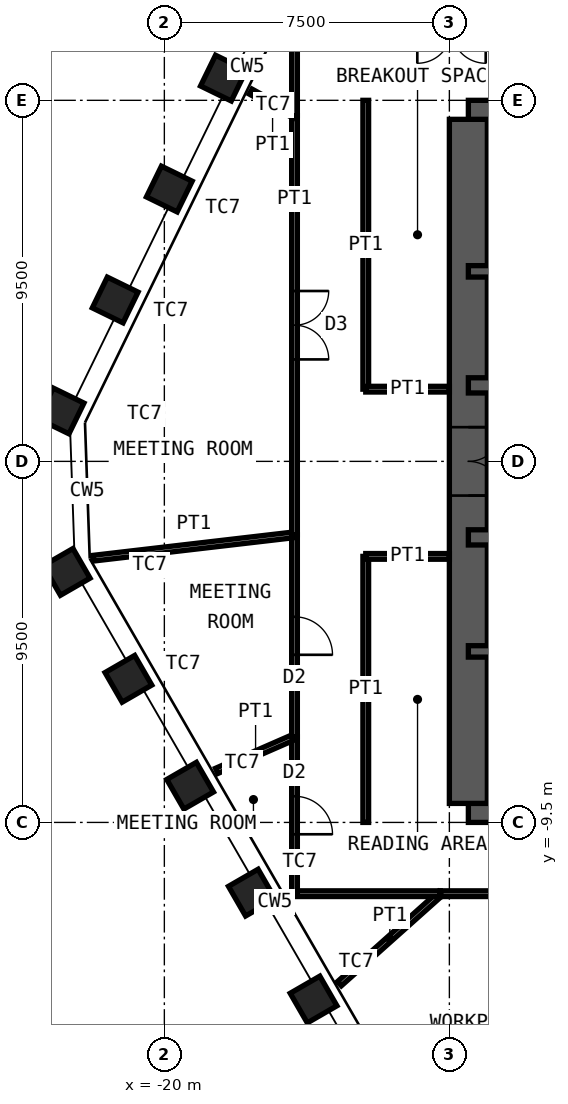
"""IFC4 building model, lengths in metres.
Left out: names, types, materials, properties, quantities, classifications, styles, units other than length and angle.
Written with IfcOpenShell. Run it as: python <this file> out.ifc"""

import sys

from ifc_helpers import new_model, si_unit, direction, frame, frame_2d, origin, origin_2d, place, context, subcontext, project, spatial, rectangle, hollow_rectangle, extrude, element, fill, save


model = new_model("IFC4")
c1 = context("Model", 3, precision=1e-05, world=origin(), true_north=direction((0.0, 1.0)))
c2 = subcontext(c1, "Body", "Model", "MODEL_VIEW")
j1 = project(units=[si_unit("LENGTHUNIT", "METRE"), si_unit("PLANEANGLEUNIT", "RADIAN")], contexts=[c1])
p1 = place(None, origin())
s1 = spatial("IfcSite", under=j1, at=p1, CompositionType="ELEMENT")
p2 = place(p1, origin())
s2 = spatial("IfcBuilding", under=s1, at=p2, CompositionType="ELEMENT")
p3 = place(p2, frame((0.0, 0.0, 283.0)))
s3 = spatial("IfcBuildingStorey", under=s2, at=p3, CompositionType="ELEMENT", Elevation=283.0)
for number, where, z_axis, x_axis in (
    (1, (-16.073, -14.16, 0.0), (0.0, 0.0, 1.0), (0.5, -0.866, 0.0)),
    (2, (-17.698, -11.347, 0.0), (0.0, 0.0, 1.0), (0.5, -0.866, 0.0)),
    (3, (-19.322, -8.534, 0.0), (0.0, 0.0, 1.0), (0.5, -0.866, 0.0)),
    (4, (-20.946, -5.721, 0.0), (0.0, 0.0, 1.0), (0.5, -0.866, 0.0)),
    (5, (-22.57, -2.908, 0.0), (0.0, 0.0, 1.0), (0.5, -0.866, 0.0)),
    (6, (-22.717, 1.327, 0.0), (0.0, 0.0, 1.0), (-0.438, -0.899, 0.0)),
    (7, (-21.293, 4.246, 0.0), (0.0, 0.0, 1.0), (-0.438, -0.899, 0.0)),
    (8, (-19.87, 7.166, 0.0), (0.0, 0.0, 1.0), (-0.438, -0.899, 0.0)),
    (9, (-18.446, 10.085, 0.0), (0.0, 0.0, 1.0), (-0.438, -0.899, 0.0)),
):
    element("IfcColumn", number, at=place(p3, frame(where, z_axis=z_axis, x_axis=x_axis)), inside=s3, PredefinedType="COLUMN", context=c2, shape_type="SweptSolid", body=[
        extrude(hollow_rectangle(XDim=0.9, YDim=0.9, WallThickness=0.06, at=origin_2d()), origin(), (0.0, 0.0, 1.0), 4.2),
    ])
p4 = place(p3, frame((-12.0, 9.0, 0.0), z_axis=(0.0, 0.0, 1.0), x_axis=(1.0, 0.0, 0.0)))
e10 = element("IfcWall", 10, at=p4, inside=s3, PredefinedType="SHEAR", context=c2, shape_type="SweptSolid", body=[
    extrude(rectangle(XDim=24.0, YDim=1.0, at=frame_2d((12.0, 0.0))), origin(), (0.0, 0.0, 1.0), 4.2),
])
p5 = place(p4, frame((10.4, 0.0, 0.0)))
e11 = element("IfcOpeningElement", 11, at=p5, cuts=e10, PredefinedType="OPENING", context=c2, shape_type="SweptSolid", body=[
    extrude(rectangle(XDim=1.0, YDim=2.1, at=frame_2d((0.5, 1.05))), frame((0.0, 0.51, 0.0), z_axis=(0.0, -1.0, 0.0), x_axis=(1.0, 0.0, 0.0)), (0.0, 0.0, 1.0), 1.02),
])
p6 = place(p4, frame((17.6, 0.0, 0.0)))
e12 = element("IfcOpeningElement", 12, at=p6, cuts=e10, PredefinedType="OPENING", context=c2, shape_type="SweptSolid", body=[
    extrude(rectangle(XDim=0.9, YDim=2.1, at=frame_2d((0.45, 1.05))), frame((0.0, 0.51, 0.0), z_axis=(0.0, -1.0, 0.0), x_axis=(1.0, 0.0, 0.0)), (0.0, 0.0, 1.0), 1.02),
])
p7 = place(p4, frame((21.9, 0.0, 0.0)))
e13 = element("IfcOpeningElement", 13, at=p7, cuts=e10, PredefinedType="OPENING", context=c2, shape_type="SweptSolid", body=[
    extrude(rectangle(XDim=0.9, YDim=2.1, at=frame_2d((0.45, 1.05))), frame((0.0, 0.51, 0.0), z_axis=(0.0, -1.0, 0.0), x_axis=(1.0, 0.0, 0.0)), (0.0, 0.0, 1.0), 1.02),
])
p8 = place(p3, frame((-12.0, -9.0, 0.0), z_axis=(0.0, 0.0, 1.0), x_axis=(1.0, 0.0, 0.0)))
e14 = element("IfcWall", 14, at=p8, inside=s3, PredefinedType="SHEAR", context=c2, shape_type="SweptSolid", body=[
    extrude(rectangle(XDim=24.0, YDim=1.0, at=frame_2d((12.0, 0.0))), origin(), (0.0, 0.0, 1.0), 4.2),
])
p9 = place(p8, frame((1.35, 0.0, 0.0)))
e15 = element("IfcOpeningElement", 15, at=p9, cuts=e14, PredefinedType="OPENING", context=c2, shape_type="SweptSolid", body=[
    extrude(rectangle(XDim=1.0, YDim=2.1, at=frame_2d((0.5, 1.05))), frame((0.0, 0.51, 0.0), z_axis=(0.0, -1.0, 0.0), x_axis=(1.0, 0.0, 0.0)), (0.0, 0.0, 1.0), 1.02),
])
p10 = place(p8, frame((5.325, 0.0, 0.0)))
e16 = element("IfcOpeningElement", 16, at=p10, cuts=e14, PredefinedType="OPENING", context=c2, shape_type="SweptSolid", body=[
    extrude(rectangle(XDim=1.15, YDim=2.1, at=frame_2d((0.575, 1.05))), frame((0.0, 0.51, 0.0), z_axis=(0.0, -1.0, 0.0), x_axis=(1.0, 0.0, 0.0)), (0.0, 0.0, 1.0), 1.02),
])
p11 = place(p8, frame((12.6, 0.0, 0.0)))
e17 = element("IfcOpeningElement", 17, at=p11, cuts=e14, PredefinedType="OPENING", context=c2, shape_type="SweptSolid", body=[
    extrude(rectangle(XDim=1.0, YDim=2.1, at=frame_2d((0.5, 1.05))), frame((0.0, 0.51, 0.0), z_axis=(0.0, -1.0, 0.0), x_axis=(1.0, 0.0, 0.0)), (0.0, 0.0, 1.0), 1.02),
])
p12 = place(p3, frame((-12.0, -9.0, 0.0), z_axis=(0.0, 0.0, 1.0), x_axis=(0.0, 1.0, 0.0)))
e18 = element("IfcWall", 18, at=p12, inside=s3, PredefinedType="SHEAR", context=c2, shape_type="SweptSolid", body=[
    extrude(rectangle(XDim=18.0, YDim=1.0, at=frame_2d((9.0, 0.0))), origin(), (0.0, 0.0, 1.0), 4.2),
])
p13 = place(p12, frame((8.1, 0.0, 0.0)))
e19 = element("IfcOpeningElement", 19, at=p13, cuts=e18, PredefinedType="OPENING", context=c2, shape_type="SweptSolid", body=[
    extrude(rectangle(XDim=1.8, YDim=2.1, at=frame_2d((0.9, 1.05))), frame((0.0, 0.51, 0.0), z_axis=(0.0, -1.0, 0.0), x_axis=(1.0, 0.0, 0.0)), (0.0, 0.0, 1.0), 1.02),
])
p14 = place(p3, frame((-12.0, 5.0, 0.0), z_axis=(0.0, 0.0, 1.0), x_axis=(1.0, 0.0, 0.0)))
e20 = element("IfcWall", 20, at=p14, inside=s3, PredefinedType="SHEAR", context=c2, shape_type="SweptSolid", body=[
    extrude(rectangle(XDim=24.0, YDim=0.3, at=frame_2d((12.0, 0.0))), origin(), (0.0, 0.0, 1.0), 4.2),
])
p15 = place(p3, frame((-12.0, 2.0, 0.0), z_axis=(0.0, 0.0, 1.0), x_axis=(1.0, 0.0, 0.0)))
e21 = element("IfcWall", 21, at=p15, inside=s3, PredefinedType="SHEAR", context=c2, shape_type="SweptSolid", body=[
    extrude(rectangle(XDim=24.0, YDim=0.4, at=frame_2d((12.0, 0.0))), origin(), (0.0, 0.0, 1.0), 4.2),
])
p16 = place(p15, frame((2.4, 0.0, 0.0)))
e22 = element("IfcOpeningElement", 22, at=p16, cuts=e21, PredefinedType="OPENING", context=c2, shape_type="SweptSolid", body=[
    extrude(rectangle(XDim=1.1, YDim=2.1, at=frame_2d((0.55, 1.05))), frame((0.0, 0.21, 0.0), z_axis=(0.0, -1.0, 0.0), x_axis=(1.0, 0.0, 0.0)), (0.0, 0.0, 1.0), 0.42),
])
p17 = place(p15, frame((22.0, 0.0, 0.0)))
e23 = element("IfcOpeningElement", 23, at=p17, cuts=e21, PredefinedType="OPENING", context=c2, shape_type="SweptSolid", body=[
    extrude(rectangle(XDim=1.1, YDim=2.1, at=frame_2d((0.55, 1.05))), frame((0.0, 0.21, 0.0), z_axis=(0.0, -1.0, 0.0), x_axis=(1.0, 0.0, 0.0)), (0.0, 0.0, 1.0), 0.42),
])
p18 = place(p15, frame((10.15, 0.0, 0.0)))
e24 = element("IfcOpeningElement", 24, at=p18, cuts=e21, PredefinedType="OPENING", context=c2, shape_type="SweptSolid", body=[
    extrude(rectangle(XDim=1.0, YDim=2.1, at=frame_2d((0.5, 1.05))), frame((0.0, 0.21, 0.0), z_axis=(0.0, -1.0, 0.0), x_axis=(1.0, 0.0, 0.0)), (0.0, 0.0, 1.0), 0.42),
])
p19 = place(p15, frame((6.9, 0.0, 0.0)))
e25 = element("IfcOpeningElement", 25, at=p19, cuts=e21, PredefinedType="OPENING", context=c2, shape_type="SweptSolid", body=[
    extrude(rectangle(XDim=1.0, YDim=2.1, at=frame_2d((0.5, 1.05))), frame((0.0, 0.21, 0.0), z_axis=(0.0, -1.0, 0.0), x_axis=(1.0, 0.0, 0.0)), (0.0, 0.0, 1.0), 0.42),
])
p20 = place(p15, frame((13.35, 0.0, 0.0)))
e26 = element("IfcOpeningElement", 26, at=p20, cuts=e21, PredefinedType="OPENING", context=c2, shape_type="SweptSolid", body=[
    extrude(rectangle(XDim=1.1, YDim=2.4, at=frame_2d((0.55, 1.2))), frame((0.0, 0.21, 0.0), z_axis=(0.0, -1.0, 0.0), x_axis=(1.0, 0.0, 0.0)), (0.0, 0.0, 1.0), 0.42),
])
p21 = place(p15, frame((16.15, 0.0, 0.0)))
e27 = element("IfcOpeningElement", 27, at=p21, cuts=e21, PredefinedType="OPENING", context=c2, shape_type="SweptSolid", body=[
    extrude(rectangle(XDim=1.1, YDim=2.4, at=frame_2d((0.55, 1.2))), frame((0.0, 0.21, 0.0), z_axis=(0.0, -1.0, 0.0), x_axis=(1.0, 0.0, 0.0)), (0.0, 0.0, 1.0), 0.42),
])
p22 = place(p15, frame((19.0, 0.0, 0.0)))
e28 = element("IfcOpeningElement", 28, at=p22, cuts=e21, PredefinedType="OPENING", context=c2, shape_type="SweptSolid", body=[
    extrude(rectangle(XDim=1.0, YDim=2.1, at=frame_2d((0.5, 1.05))), frame((0.0, 0.21, 0.0), z_axis=(0.0, -1.0, 0.0), x_axis=(1.0, 0.0, 0.0)), (0.0, 0.0, 1.0), 0.42),
])
p23 = place(p3, frame((-12.0, -2.0, 0.0), z_axis=(0.0, 0.0, 1.0), x_axis=(1.0, 0.0, 0.0)))
e29 = element("IfcWall", 29, at=p23, inside=s3, PredefinedType="SHEAR", context=c2, shape_type="SweptSolid", body=[
    extrude(rectangle(XDim=24.0, YDim=0.4, at=frame_2d((12.0, 0.0))), origin(), (0.0, 0.0, 1.0), 4.2),
])
p24 = place(p23, frame((1.1, 0.0, 0.0)))
e30 = element("IfcOpeningElement", 30, at=p24, cuts=e29, PredefinedType="OPENING", context=c2, shape_type="SweptSolid", body=[
    extrude(rectangle(XDim=1.1, YDim=2.1, at=frame_2d((0.55, 1.05))), frame((0.0, 0.21, 0.0), z_axis=(0.0, -1.0, 0.0), x_axis=(1.0, 0.0, 0.0)), (0.0, 0.0, 1.0), 0.42),
])
p25 = place(p23, frame((13.55, 0.0, 0.0)))
e31 = element("IfcOpeningElement", 31, at=p25, cuts=e29, PredefinedType="OPENING", context=c2, shape_type="SweptSolid", body=[
    extrude(rectangle(XDim=1.1, YDim=2.1, at=frame_2d((0.55, 1.05))), frame((0.0, 0.21, 0.0), z_axis=(0.0, -1.0, 0.0), x_axis=(1.0, 0.0, 0.0)), (0.0, 0.0, 1.0), 0.42),
])
p26 = place(p23, frame((20.7, 0.0, 0.0)))
e32 = element("IfcOpeningElement", 32, at=p26, cuts=e29, PredefinedType="OPENING", context=c2, shape_type="SweptSolid", body=[
    extrude(rectangle(XDim=1.1, YDim=2.1, at=frame_2d((0.55, 1.05))), frame((0.0, 0.21, 0.0), z_axis=(0.0, -1.0, 0.0), x_axis=(1.0, 0.0, 0.0)), (0.0, 0.0, 1.0), 0.42),
])
p27 = place(p23, frame((4.0, 0.0, 0.0)))
e33 = element("IfcOpeningElement", 33, at=p27, cuts=e29, PredefinedType="OPENING", context=c2, shape_type="SweptSolid", body=[
    extrude(rectangle(XDim=1.0, YDim=2.1, at=frame_2d((0.5, 1.05))), frame((0.0, 0.21, 0.0), z_axis=(0.0, -1.0, 0.0), x_axis=(1.0, 0.0, 0.0)), (0.0, 0.0, 1.0), 0.42),
])
p28 = place(p23, frame((6.8, 0.0, 0.0)))
e34 = element("IfcOpeningElement", 34, at=p28, cuts=e29, PredefinedType="OPENING", context=c2, shape_type="SweptSolid", body=[
    extrude(rectangle(XDim=1.0, YDim=2.1, at=frame_2d((0.5, 1.05))), frame((0.0, 0.21, 0.0), z_axis=(0.0, -1.0, 0.0), x_axis=(1.0, 0.0, 0.0)), (0.0, 0.0, 1.0), 0.42),
])
p29 = place(p23, frame((9.6, 0.0, 0.0)))
e35 = element("IfcOpeningElement", 35, at=p29, cuts=e29, PredefinedType="OPENING", context=c2, shape_type="SweptSolid", body=[
    extrude(rectangle(XDim=1.0, YDim=2.1, at=frame_2d((0.5, 1.05))), frame((0.0, 0.21, 0.0), z_axis=(0.0, -1.0, 0.0), x_axis=(1.0, 0.0, 0.0)), (0.0, 0.0, 1.0), 0.42),
])
p30 = place(p3, frame((-12.0, -5.0, 0.0), z_axis=(0.0, 0.0, 1.0), x_axis=(1.0, 0.0, 0.0)))
e36 = element("IfcWall", 36, at=p30, inside=s3, PredefinedType="SHEAR", context=c2, shape_type="SweptSolid", body=[
    extrude(rectangle(XDim=24.0, YDim=0.3, at=frame_2d((12.0, 0.0))), origin(), (0.0, 0.0, 1.0), 4.2),
])
p31 = place(p3, frame((-5.027, -11.375, 0.0), z_axis=(0.0, 0.0, 1.0), x_axis=(-1.0, 0.0, 0.0)))
e37 = element("IfcWall", 37, at=p31, inside=s3, PredefinedType="PARTITIONING", context=c2, shape_type="SweptSolid", body=[
    extrude(rectangle(XDim=7.713, YDim=0.15, at=frame_2d((3.856, 0.0))), origin(), (0.0, 0.0, 1.0), 4.03),
])
p32 = place(p31, frame((3.356, 0.0, 0.0)))
e38 = element("IfcOpeningElement", 38, at=p32, cuts=e37, PredefinedType="OPENING", context=c2, shape_type="SweptSolid", body=[
    extrude(rectangle(XDim=1.0, YDim=2.4, at=frame_2d((0.5, 1.2))), frame((0.0, 0.085, 0.0), z_axis=(0.0, -1.0, 0.0), x_axis=(1.0, 0.0, 0.0)), (0.0, 0.0, 1.0), 0.17),
])
p33 = place(p3, frame((-15.393, -13.743, 0.0), z_axis=(0.0, 0.0, 1.0), x_axis=(0.745934007174, 0.666019862273, 0.0)))
e39 = element("IfcWall", 39, at=p33, inside=s3, PredefinedType="PARTITIONING", context=c2, shape_type="SweptSolid", body=[
    extrude(rectangle(XDim=3.556, YDim=0.15, at=frame_2d((1.778, 0.0))), origin(), (0.0, 0.0, 1.0), 3.33),
])
p34 = place(p3, frame((-12.74, -11.375, 0.0), z_axis=(0.0, 0.0, 1.0), x_axis=(-1.0, 0.0, 0.0)))
e40 = element("IfcWall", 40, at=p34, inside=s3, PredefinedType="PARTITIONING", context=c2, shape_type="SweptSolid", body=[
    extrude(rectangle(XDim=3.835, YDim=0.15, at=frame_2d((1.917, 0.0))), origin(), (0.0, 0.0, 1.0), 4.03),
])
p35 = place(p3, frame((-16.575, -11.375, 0.0), z_axis=(0.0, 0.0, 1.0), x_axis=(0.0, 1.0, 0.0)))
e41 = element("IfcWall", 41, at=p35, inside=s3, PredefinedType="PARTITIONING", context=c2, shape_type="SweptSolid", body=[
    extrude(rectangle(XDim=4.127, YDim=0.15, at=frame_2d((2.063, 0.0))), origin(), (0.0, 0.0, 1.0), 4.03),
])
p36 = place(p35, frame((1.563, 0.0, 0.0)))
e42 = element("IfcOpeningElement", 42, at=p36, cuts=e41, PredefinedType="OPENING", context=c2, shape_type="SweptSolid", body=[
    extrude(rectangle(XDim=1.0, YDim=2.4, at=frame_2d((0.5, 1.2))), frame((0.0, 0.085, 0.0), z_axis=(0.0, -1.0, 0.0), x_axis=(1.0, 0.0, 0.0)), (0.0, 0.0, 1.0), 0.17),
])
p37 = place(p3, frame((-18.624, -8.144, 0.0), z_axis=(0.0, 0.0, 1.0), x_axis=(0.916199931106, 0.400721457176, 0.0)))
e43 = element("IfcWall", 43, at=p37, inside=s3, PredefinedType="PARTITIONING", context=c2, shape_type="SweptSolid", body=[
    extrude(rectangle(XDim=2.236, YDim=0.15, at=frame_2d((1.118, 0.0))), origin(), (0.0, 0.0, 1.0), 3.33),
])
p38 = place(p3, frame((-16.575, -7.248, 0.0), z_axis=(0.0, 0.0, 1.0), x_axis=(0.0, 1.0, 0.0)))
e44 = element("IfcWall", 44, at=p38, inside=s3, PredefinedType="PARTITIONING", context=c2, shape_type="SweptSolid", body=[
    extrude(rectangle(XDim=5.317, YDim=0.15, at=frame_2d((2.659, 0.0))), origin(), (0.0, 0.0, 1.0), 4.03),
])
p39 = place(p38, frame((2.159, 0.0, 0.0)))
e45 = element("IfcOpeningElement", 45, at=p39, cuts=e44, PredefinedType="OPENING", context=c2, shape_type="SweptSolid", body=[
    extrude(rectangle(XDim=1.0, YDim=2.4, at=frame_2d((0.5, 1.2))), frame((0.0, 0.085, 0.0), z_axis=(0.0, -1.0, 0.0), x_axis=(1.0, 0.0, 0.0)), (0.0, 0.0, 1.0), 0.17),
])
p40 = place(p3, frame((-21.864, -2.547, 0.0), z_axis=(0.0, 0.0, 1.0), x_axis=(0.993286690457, 0.115678652143, 0.0)))
e46 = element("IfcWall", 46, at=p40, inside=s3, PredefinedType="PARTITIONING", context=c2, shape_type="SweptSolid", body=[
    extrude(rectangle(XDim=5.325, YDim=0.15, at=frame_2d((2.662, 0.0))), origin(), (0.0, 0.0, 1.0), 2.93),
])
p41 = place(p3, frame((-16.575, -1.931, 0.0), z_axis=(0.0, 0.0, 1.0), x_axis=(0.0, 1.0, 0.0)))
e47 = element("IfcWall", 47, at=p41, inside=s3, PredefinedType="PARTITIONING", context=c2, shape_type="SweptSolid", body=[
    extrude(rectangle(XDim=11.028, YDim=0.15, at=frame_2d((5.514, 0.0))), origin(), (0.0, 0.0, 1.0), 4.03),
])
p42 = place(p41, frame((4.614, 0.0, 0.0)))
e48 = element("IfcOpeningElement", 48, at=p42, cuts=e47, PredefinedType="OPENING", context=c2, shape_type="SweptSolid", body=[
    extrude(rectangle(XDim=1.8, YDim=2.4, at=frame_2d((0.9, 1.2))), frame((0.0, 0.085, 0.0), z_axis=(0.0, -1.0, 0.0), x_axis=(1.0, 0.0, 0.0)), (0.0, 0.0, 1.0), 0.17),
])
p43 = place(p3, frame((-17.729, 9.73, 0.0), z_axis=(0.0, 0.0, 1.0), x_axis=(0.87667364743, -0.481085559855, 0.0)))
e49 = element("IfcWall", 49, at=p43, inside=s3, PredefinedType="PARTITIONING", context=c2, shape_type="SweptSolid", body=[
    extrude(rectangle(XDim=1.316, YDim=0.15, at=frame_2d((0.658, 0.0))), origin(), (0.0, 0.0, 1.0), 3.33),
])
p44 = place(p3, frame((-16.575, 9.097, 0.0), z_axis=(0.0, 0.0, 1.0), x_axis=(0.0, 1.0, 0.0)))
e50 = element("IfcWall", 50, at=p44, inside=s3, PredefinedType="PARTITIONING", context=c2, shape_type="SweptSolid", body=[
    extrude(rectangle(XDim=2.278, YDim=0.15, at=frame_2d((1.139, 0.0))), origin(), (0.0, 0.0, 1.0), 4.03),
])
p45 = place(p3, frame((-14.7, 1.9, 0.0), z_axis=(0.0, 0.0, 1.0), x_axis=(0.0, 1.0, 0.0)))
e51 = element("IfcWall", 51, at=p45, inside=s3, PredefinedType="PARTITIONING", context=c2, shape_type="SweptSolid", body=[
    extrude(rectangle(XDim=7.6, YDim=0.15, at=frame_2d((3.8, 0.0))), origin(), (0.0, 0.0, 1.0), 4.03),
])
p46 = place(p3, frame((-12.5, 1.9, 0.0), z_axis=(0.0, 0.0, 1.0), x_axis=(-1.0, 0.0, 0.0)))
e52 = element("IfcWall", 52, at=p46, inside=s3, PredefinedType="PARTITIONING", context=c2, shape_type="SweptSolid", body=[
    extrude(rectangle(XDim=2.2, YDim=0.15, at=frame_2d((1.1, 0.0))), origin(), (0.0, 0.0, 1.0), 3.53),
])
p47 = place(p3, frame((-14.7, -9.5, 0.0), z_axis=(0.0, 0.0, 1.0), x_axis=(0.0, 1.0, 0.0)))
e53 = element("IfcWall", 53, at=p47, inside=s3, PredefinedType="PARTITIONING", context=c2, shape_type="SweptSolid", body=[
    extrude(rectangle(XDim=7.0, YDim=0.15, at=frame_2d((3.5, 0.0))), origin(), (0.0, 0.0, 1.0), 4.03),
])
p48 = place(p3, frame((-12.5, -2.5, 0.0), z_axis=(0.0, 0.0, 1.0), x_axis=(-1.0, 0.0, 0.0)))
e54 = element("IfcWall", 54, at=p48, inside=s3, PredefinedType="PARTITIONING", context=c2, shape_type="SweptSolid", body=[
    extrude(rectangle(XDim=2.2, YDim=0.15, at=frame_2d((1.1, 0.0))), origin(), (0.0, 0.0, 1.0), 3.53),
])
p49 = place(p13, origin())
e55 = element("IfcDoor", 55, at=p49, inside=s3, OperationType="DOUBLE_DOOR_DOUBLE_SWING", PredefinedType="DOOR", context=c2, shape_type="SweptSolid", body=[
    extrude(rectangle(XDim=1.8, YDim=2.1, at=frame_2d((0.9, 1.05))), frame((0.0, 0.025, 0.0), z_axis=(0.0, -1.0, 0.0), x_axis=(1.0, 0.0, 0.0)), (0.0, 0.0, 1.0), 0.05),
])
fill(e19, e55)
p50 = place(p36, origin())
e56 = element("IfcDoor", 56, at=p50, inside=s3, OperationType="SINGLE_SWING_LEFT", PredefinedType="DOOR", context=c2, shape_type="SweptSolid", body=[
    extrude(rectangle(XDim=1.0, YDim=2.4, at=frame_2d((0.5, 1.2))), frame((0.0, 0.025, 0.0), z_axis=(0.0, -1.0, 0.0), x_axis=(1.0, 0.0, 0.0)), (0.0, 0.0, 1.0), 0.05),
])
fill(e42, e56)
p51 = place(p39, origin())
e57 = element("IfcDoor", 57, at=p51, inside=s3, OperationType="SINGLE_SWING_LEFT", PredefinedType="DOOR", context=c2, shape_type="SweptSolid", body=[
    extrude(rectangle(XDim=1.0, YDim=2.4, at=frame_2d((0.5, 1.2))), frame((0.0, 0.025, 0.0), z_axis=(0.0, -1.0, 0.0), x_axis=(1.0, 0.0, 0.0)), (0.0, 0.0, 1.0), 0.05),
])
fill(e45, e57)
p52 = place(p42, origin())
e58 = element("IfcDoor", 58, at=p52, inside=s3, OperationType="DOUBLE_DOOR_DOUBLE_SWING", PredefinedType="DOOR", context=c2, shape_type="SweptSolid", body=[
    extrude(rectangle(XDim=1.8, YDim=2.4, at=frame_2d((0.9, 1.2))), frame((0.0, 0.025, 0.0), z_axis=(0.0, -1.0, 0.0), x_axis=(1.0, 0.0, 0.0)), (0.0, 0.0, 1.0), 0.05),
])
fill(e48, e58)
save(model, sys.argv[1])
